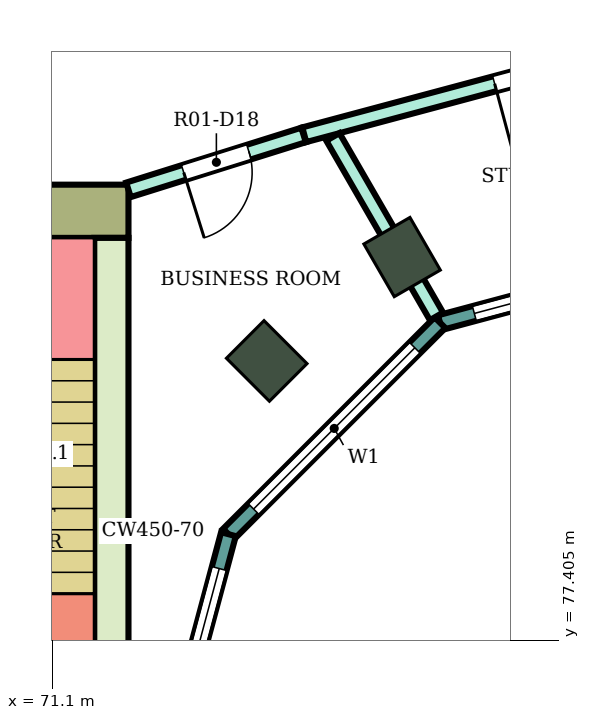
"""IFC4 building model, lengths in metres.
Left out: names, types, materials, properties, quantities, classifications, styles, units other than length and angle.
Written with IfcOpenShell. Run it as: python <this file> out.ifc"""

import sys

from ifc_helpers import new_model, si_unit, direction, frame, frame_2d, origin, origin_2d, place, context, subcontext, project, spatial, rectangle, extrude, element, fill, save


model = new_model("IFC4")
c1 = context("Model", 3, precision=1e-05, world=origin(), true_north=direction((0.0, 1.0)))
c2 = subcontext(c1, "Body", "Model", "MODEL_VIEW")
j1 = project(units=[si_unit("LENGTHUNIT", "METRE"), si_unit("PLANEANGLEUNIT", "RADIAN")], contexts=[c1])
p1 = place(None, origin())
s1 = spatial("IfcSite", under=j1, at=p1, CompositionType="ELEMENT")
p2 = place(p1, origin())
s2 = spatial("IfcBuilding", under=s1, at=p2, CompositionType="ELEMENT")
p3 = place(p2, frame((0.0, 0.0, 157.7)))
s3 = spatial("IfcBuildingStorey", under=s2, at=p3, CompositionType="ELEMENT", Elevation=157.7)
for number, where, z_axis, x_axis in (
    (1, (75.7, 82.448, 0.0), (0.0, 0.0, 1.0), (-0.5, 0.866, 0.0)),
    (2, (73.919, 81.081, 0.0), (0.0, 0.0, 1.0), (-0.707, 0.707, 0.0)),
):
    element("IfcColumn", number, at=place(p3, frame(where, z_axis=z_axis, x_axis=x_axis)), inside=s3, PredefinedType="COLUMN", context=c2, shape_type="SweptSolid", body=[
        extrude(rectangle(XDim=0.8, YDim=0.7, at=origin_2d()), origin(), (0.0, 0.0, 1.0), 4.1),
    ])
p4 = place(p3, frame((72.1, 83.05, 0.0), z_axis=(0.0, 0.0, 1.0), x_axis=(-1.0, 0.0, 0.0)))
e3 = element("IfcWall", 3, at=p4, inside=s3, PredefinedType="SHEAR", context=c2, shape_type="SweptSolid", body=[
    extrude(rectangle(XDim=14.8, YDim=0.7, at=frame_2d((7.4, 0.0))), origin(), (0.0, 0.0, 1.0), 3.78),
])
p5 = place(p4, frame((4.2, 0.0, 0.0)))
e4 = element("IfcOpeningElement", 4, at=p5, cuts=e3, PredefinedType="OPENING", context=c2, shape_type="SweptSolid", body=[
    extrude(rectangle(XDim=2.4, YDim=2.4, at=frame_2d((1.2, 1.2))), frame((0.0, 0.36, 0.0), z_axis=(0.0, -1.0, 0.0), x_axis=(1.0, 0.0, 0.0)), (0.0, 0.0, 1.0), 0.72),
])
p6 = place(p3, frame((71.875, 82.7, 0.0), z_axis=(0.0, 0.0, 1.0), x_axis=(0.0, -1.0, 0.0)))
e5 = element("IfcWall", 5, at=p6, inside=s3, PredefinedType="SHEAR", context=c2, shape_type="SweptSolid", body=[
    extrude(rectangle(XDim=7.7, YDim=0.45, at=frame_2d((3.85, 0.0))), origin(), (0.0, 0.0, 1.0), 3.78),
])
p7 = place(p3, frame((80.0, 82.604, 0.0), z_axis=(0.0, 0.0, 1.0), x_axis=(-0.965933654434, -0.258789828301, 0.0)))
e6 = element("IfcWall", 6, at=p7, inside=s3, PredefinedType="NOTDEFINED", context=c2, shape_type="SweptSolid", body=[
    extrude(rectangle(XDim=3.936, YDim=0.2, at=frame_2d((1.968, 0.0))), origin(), (0.0, 0.0, 1.0), 4.1),
])
p8 = place(p7, frame((0.468, 0.0, 0.9)))
e7 = element("IfcOpeningElement", 7, at=p8, cuts=e6, PredefinedType="OPENING", context=c2, shape_type="SweptSolid", body=[
    extrude(rectangle(XDim=3.0, YDim=2.3, at=frame_2d((1.5, 1.15))), frame((0.0, 0.11, 0.0), z_axis=(0.0, -1.0, 0.0), x_axis=(1.0, 0.0, 0.0)), (0.0, 0.0, 1.0), 0.22),
])
p9 = place(p3, frame((76.198, 81.585, 0.0), z_axis=(0.0, 0.0, 1.0), x_axis=(-0.707106781187, -0.707106781187, 0.0)))
e8 = element("IfcWall", 8, at=p9, inside=s3, PredefinedType="NOTDEFINED", context=c2, shape_type="SweptSolid", body=[
    extrude(rectangle(XDim=3.936, YDim=0.2, at=frame_2d((1.968, 0.0))), origin(), (0.0, 0.0, 1.0), 4.1),
])
p10 = place(p9, frame((0.468, 0.0, 0.9)))
e9 = element("IfcOpeningElement", 9, at=p10, cuts=e8, PredefinedType="OPENING", context=c2, shape_type="SweptSolid", body=[
    extrude(rectangle(XDim=3.0, YDim=2.3, at=frame_2d((1.5, 1.15))), frame((0.0, 0.11, 0.0), z_axis=(0.0, -1.0, 0.0), x_axis=(1.0, 0.0, 0.0)), (0.0, 0.0, 1.0), 0.22),
])
p11 = place(p3, frame((73.415, 78.802, 0.0), z_axis=(0.0, 0.0, 1.0), x_axis=(-0.258789828301, -0.965933654434, 0.0)))
e10 = element("IfcWall", 10, at=p11, inside=s3, PredefinedType="NOTDEFINED", context=c2, shape_type="SweptSolid", body=[
    extrude(rectangle(XDim=3.936, YDim=0.2, at=frame_2d((1.968, 0.0))), origin(), (0.0, 0.0, 1.0), 4.1),
])
p12 = place(p11, frame((0.468, 0.0, 0.9)))
e11 = element("IfcOpeningElement", 11, at=p12, cuts=e10, PredefinedType="OPENING", context=c2, shape_type="SweptSolid", body=[
    extrude(rectangle(XDim=3.0, YDim=2.3, at=frame_2d((1.5, 1.15))), frame((0.0, 0.11, 0.0), z_axis=(0.0, -1.0, 0.0), x_axis=(1.0, 0.0, 0.0)), (0.0, 0.0, 1.0), 0.22),
])
p13 = place(p3, frame((68.2, 84.834, 0.0), z_axis=(0.0, 0.0, 1.0), x_axis=(0.954272398161, 0.298938438661, 0.0)))
e12 = element("IfcWall", 12, at=p13, inside=s3, PredefinedType="PARTITIONING", context=c2, shape_type="SweptSolid", body=[
    extrude(rectangle(XDim=5.74, YDim=0.2, at=frame_2d((2.87, 0.0))), origin(), (0.0, 0.0, 1.0), 3.65),
])
p14 = place(p3, frame((72.1, 83.332, 0.0), z_axis=(0.0, 0.0, 1.0), x_axis=(0.954233106619, 0.299063836383, 0.0)))
e13 = element("IfcWall", 13, at=p14, inside=s3, PredefinedType="PARTITIONING", context=c2, shape_type="SweptSolid", body=[
    extrude(rectangle(XDim=2.414, YDim=0.2, at=frame_2d((1.207, 0.0))), origin(), (0.0, 0.0, 1.0), 3.65),
])
p15 = place(p14, frame((0.762, 0.0, 0.0)))
e14 = element("IfcOpeningElement", 14, at=p15, cuts=e13, PredefinedType="OPENING", context=c2, shape_type="SweptSolid", body=[
    extrude(rectangle(XDim=0.9, YDim=2.1, at=frame_2d((0.45, 1.05))), frame((0.0, 0.11, 0.0), z_axis=(0.0, -1.0, 0.0), x_axis=(1.0, 0.0, 0.0)), (0.0, 0.0, 1.0), 0.22),
])
p16 = place(p3, frame((74.413, 84.057, 0.0), z_axis=(0.0, 0.0, 1.0), x_axis=(0.965972135939, 0.258646153246, 0.0)))
e15 = element("IfcWall", 15, at=p16, inside=s3, PredefinedType="PARTITIONING", context=c2, shape_type="SweptSolid", body=[
    extrude(rectangle(XDim=5.654, YDim=0.2, at=frame_2d((2.827, 0.0))), origin(), (0.0, 0.0, 1.0), 3.65),
])
p17 = place(p16, frame((2.593, 0.0, 0.0)))
e16 = element("IfcOpeningElement", 16, at=p17, cuts=e15, PredefinedType="OPENING", context=c2, shape_type="SweptSolid", body=[
    extrude(rectangle(XDim=0.9, YDim=2.1, at=frame_2d((0.45, 1.05))), frame((0.0, 0.11, 0.0), z_axis=(0.0, -1.0, 0.0), x_axis=(1.0, 0.0, 0.0)), (0.0, 0.0, 1.0), 0.22),
])
p18 = place(p3, frame((74.79, 84.028, 0.0), z_axis=(0.0, 0.0, 1.0), x_axis=(0.499905962189, -0.866079689733, 0.0)))
e17 = element("IfcWall", 17, at=p18, inside=s3, PredefinedType="PARTITIONING", context=c2, shape_type="SweptSolid", body=[
    extrude(rectangle(XDim=2.726, YDim=0.2, at=frame_2d((1.363, 0.0))), origin(), (0.0, 0.0, 1.0), 3.65),
])
p19 = place(p8, origin())
e18 = element("IfcWindow", 18, at=p19, inside=s3, PartitioningType="SINGLE_PANEL", PredefinedType="WINDOW", context=c2, shape_type="SweptSolid", body=[
    extrude(rectangle(XDim=3.0, YDim=2.3, at=frame_2d((1.5, 1.15))), frame((0.0, 0.03, 0.0), z_axis=(0.0, -1.0, 0.0), x_axis=(1.0, 0.0, 0.0)), (0.0, 0.0, 1.0), 0.06),
])
fill(e7, e18)
p20 = place(p10, origin())
e19 = element("IfcWindow", 19, at=p20, inside=s3, PartitioningType="SINGLE_PANEL", PredefinedType="WINDOW", context=c2, shape_type="SweptSolid", body=[
    extrude(rectangle(XDim=3.0, YDim=2.3, at=frame_2d((1.5, 1.15))), frame((0.0, 0.03, 0.0), z_axis=(0.0, -1.0, 0.0), x_axis=(1.0, 0.0, 0.0)), (0.0, 0.0, 1.0), 0.06),
])
fill(e9, e19)
p21 = place(p12, origin())
e20 = element("IfcWindow", 20, at=p21, inside=s3, PartitioningType="SINGLE_PANEL", PredefinedType="WINDOW", context=c2, shape_type="SweptSolid", body=[
    extrude(rectangle(XDim=3.0, YDim=2.3, at=frame_2d((1.5, 1.15))), frame((0.0, 0.03, 0.0), z_axis=(0.0, -1.0, 0.0), x_axis=(1.0, 0.0, 0.0)), (0.0, 0.0, 1.0), 0.06),
])
fill(e11, e20)
p22 = place(p17, frame((0.9, 0.0, 0.0), z_axis=(0.0, 0.0, 1.0), x_axis=(-1.0, 0.0, 0.0)))
e21 = element("IfcDoor", 21, at=p22, inside=s3, OperationType="SINGLE_SWING_RIGHT", PredefinedType="DOOR", context=c2, shape_type="SweptSolid", body=[
    extrude(rectangle(XDim=0.9, YDim=2.1, at=frame_2d((0.45, 1.05))), frame((0.0, 0.025, 0.0), z_axis=(0.0, -1.0, 0.0), x_axis=(1.0, 0.0, 0.0)), (0.0, 0.0, 1.0), 0.05),
])
fill(e16, e21)
p23 = place(p15, frame((0.9, 0.0, 0.0), z_axis=(0.0, 0.0, 1.0), x_axis=(-1.0, 0.0, 0.0)))
e22 = element("IfcDoor", 22, at=p23, inside=s3, OperationType="SINGLE_SWING_RIGHT", PredefinedType="DOOR", context=c2, shape_type="SweptSolid", body=[
    extrude(rectangle(XDim=0.9, YDim=2.1, at=frame_2d((0.45, 1.05))), frame((0.0, 0.025, 0.0), z_axis=(0.0, -1.0, 0.0), x_axis=(1.0, 0.0, 0.0)), (0.0, 0.0, 1.0), 0.05),
])
fill(e14, e22)
save(model, sys.argv[1])
